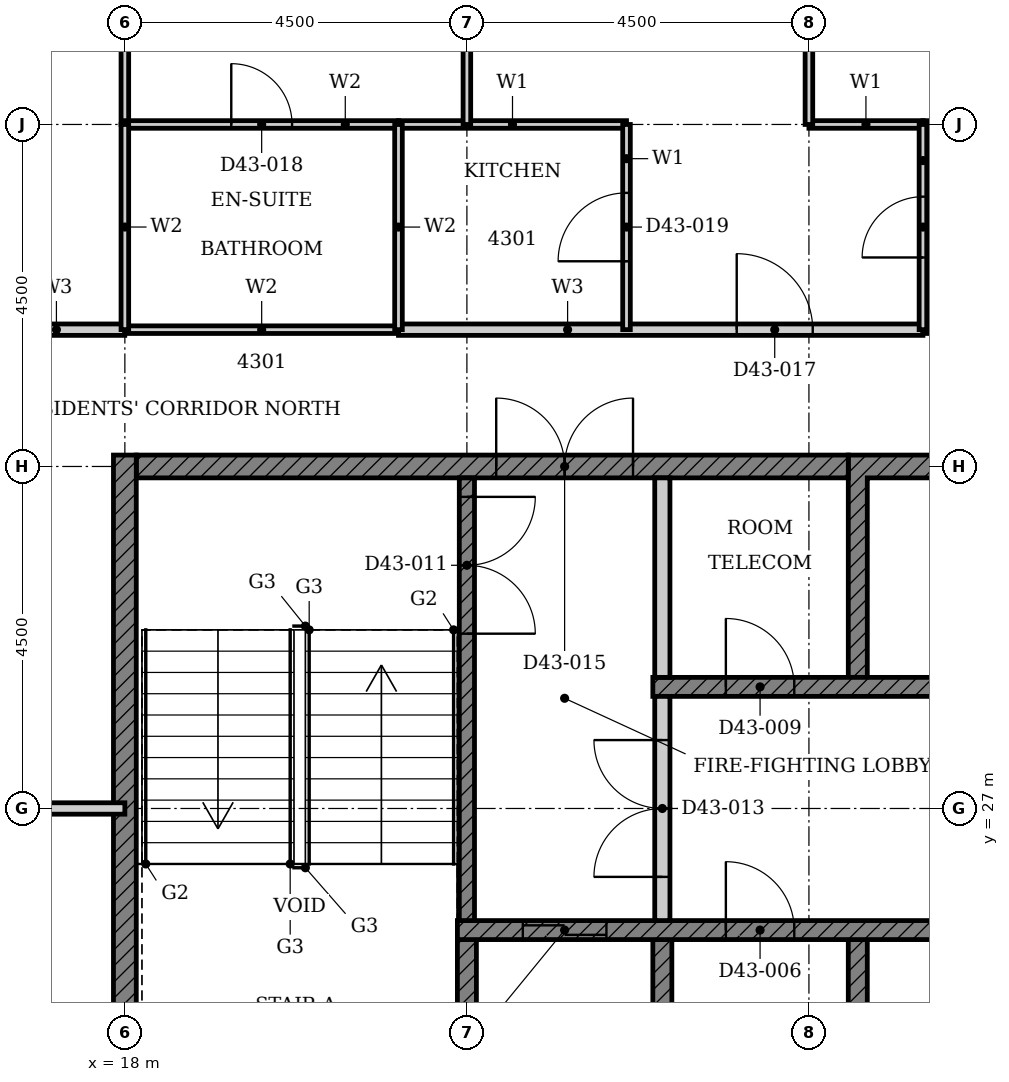
"""IFC4 building model, lengths in metres.
Left out: names, types, materials, properties, quantities, classifications, styles, units other than length and angle.
Written with IfcOpenShell. Run it as: python <this file> out.ifc"""

import sys

from ifc_helpers import new_model, si_unit, direction, frame, frame_2d, origin, place, context, subcontext, project, spatial, polyline, rectangle, outline, extrude, element, fill, save


model = new_model("IFC4")
c1 = context("Model", 3, precision=1e-05, world=origin(), true_north=direction((0.0, 1.0)))
c2 = subcontext(c1, "Body", "Model", "MODEL_VIEW")
j1 = project(units=[si_unit("LENGTHUNIT", "METRE"), si_unit("PLANEANGLEUNIT", "RADIAN")], contexts=[c1])
p1 = place(None, origin())
s1 = spatial("IfcSite", under=j1, at=p1, CompositionType="ELEMENT")
p2 = place(p1, origin())
s2 = spatial("IfcBuilding", under=s1, at=p2, CompositionType="ELEMENT")
p3 = place(p2, frame((0.0, 0.0, 172.8)))
s3 = spatial("IfcBuildingStorey", under=s2, at=p3, CompositionType="ELEMENT", Elevation=172.8)
p4 = place(p3, origin())
e1 = element("IfcWall", 1, at=p4, inside=s3, PredefinedType="SHEAR", context=c2, shape_type="SweptSolid", body=[
    extrude(outline(polyline([(22.375, 22.35), (25.197, 22.35), (25.197, 25.275), (24.947, 25.275), (24.947, 22.65), (22.625, 22.65), (22.625, 25.275), (22.375, 25.275), (22.375, 22.35)])), origin(), (0.0, 0.0, 1.0), 3.4),
])
p5 = place(p3, origin())
e2 = element("IfcWall", 2, at=p5, inside=s3, PredefinedType="SHEAR", context=c2, shape_type="SweptSolid", body=[
    extrude(outline(polyline([(27.518, 22.35), (32.911, 22.35), (32.911, 25.275), (32.661, 25.275), (32.661, 22.65), (30.339, 22.65), (30.339, 25.275), (30.089, 25.275), (30.089, 22.65), (27.768, 22.65), (27.768, 25.275), (27.518, 25.275), (27.518, 22.35)])), origin(), (0.0, 0.0, 1.0), 3.4),
])
p6 = place(p3, origin())
e3 = element("IfcWall", 3, at=p6, inside=s3, PredefinedType="SHEAR", context=c2, shape_type="SweptSolid", body=[
    extrude(outline(polyline([(27.518, 28.725), (27.768, 28.725), (27.768, 31.35), (30.089, 31.35), (30.089, 28.725), (30.339, 28.725), (30.339, 31.35), (32.661, 31.35), (32.661, 28.725), (32.911, 28.725), (32.911, 31.65), (27.518, 31.65), (27.518, 28.725)])), origin(), (0.0, 0.0, 1.0), 3.4),
])
p7 = place(p3, frame((18.15, 31.5, 0.0), z_axis=(0.0, 0.0, 1.0), x_axis=(1.0, 0.0, 0.0)))
e4 = element("IfcWall", 4, at=p7, inside=s3, PredefinedType="SHEAR", context=c2, shape_type="SweptSolid", body=[
    extrude(rectangle(XDim=9.368, YDim=0.3, at=frame_2d((4.684, 0.0))), origin(), (0.0, 0.0, 1.0), 3.4),
])
p8 = place(p7, frame((4.736, 0.0, 0.0)))
e5 = element("IfcOpeningElement", 5, at=p8, cuts=e4, PredefinedType="OPENING", context=c2, shape_type="SweptSolid", body=[
    extrude(rectangle(XDim=1.8, YDim=2.1, at=frame_2d((0.9, 1.05))), frame((0.0, 0.16, 0.0), z_axis=(0.0, -1.0, 0.0), x_axis=(1.0, 0.0, 0.0)), (0.0, 0.0, 1.0), 0.32),
])
p9 = place(p3, frame((18.0, 22.35, 0.0), z_axis=(0.0, 0.0, 1.0), x_axis=(0.0, 1.0, 0.0)))
e6 = element("IfcWall", 6, at=p9, inside=s3, PredefinedType="SHEAR", context=c2, shape_type="SweptSolid", body=[
    extrude(rectangle(XDim=9.3, YDim=0.3, at=frame_2d((4.65, 0.0))), origin(), (0.0, 0.0, 1.0), 3.4),
])
p10 = place(p3, frame((22.375, 25.4, 0.0), z_axis=(0.0, 0.0, 1.0), x_axis=(1.0, 0.0, 0.0)))
e7 = element("IfcWall", 7, at=p10, inside=s3, PredefinedType="SHEAR", context=c2, shape_type="SweptSolid", body=[
    extrude(rectangle(XDim=15.678, YDim=0.25, at=frame_2d((7.839, 0.0))), origin(), (0.0, 0.0, 1.0), 3.4),
])
p11 = place(p10, frame((8.575, 0.0, 0.0)))
e8 = element("IfcOpeningElement", 8, at=p11, cuts=e7, PredefinedType="OPENING", context=c2, shape_type="SweptSolid", body=[
    extrude(rectangle(XDim=1.1, YDim=2.1, at=frame_2d((0.55, 1.05))), frame((0.0, 0.135, 0.0), z_axis=(0.0, -1.0, 0.0), x_axis=(1.0, 0.0, 0.0)), (0.0, 0.0, 1.0), 0.27),
])
p12 = place(p10, frame((0.861, 0.0, 0.0)))
e9 = element("IfcOpeningElement", 9, at=p12, cuts=e7, PredefinedType="OPENING", context=c2, shape_type="SweptSolid", body=[
    extrude(rectangle(XDim=1.1, YDim=2.1, at=frame_2d((0.55, 1.05))), frame((0.0, 0.135, 0.0), z_axis=(0.0, -1.0, 0.0), x_axis=(1.0, 0.0, 0.0)), (0.0, 0.0, 1.0), 0.27),
])
p13 = place(p10, frame((3.532, 0.0, 0.0)))
e10 = element("IfcOpeningElement", 10, at=p13, cuts=e7, PredefinedType="OPENING", context=c2, shape_type="SweptSolid", body=[
    extrude(rectangle(XDim=0.9, YDim=2.1, at=frame_2d((0.45, 1.05))), frame((0.0, 0.135, 0.0), z_axis=(0.0, -1.0, 0.0), x_axis=(1.0, 0.0, 0.0)), (0.0, 0.0, 1.0), 0.27),
])
p14 = place(p10, frame((11.246, 0.0, 0.0)))
e11 = element("IfcOpeningElement", 11, at=p14, cuts=e7, PredefinedType="OPENING", context=c2, shape_type="SweptSolid", body=[
    extrude(rectangle(XDim=0.9, YDim=2.1, at=frame_2d((0.45, 1.05))), frame((0.0, 0.135, 0.0), z_axis=(0.0, -1.0, 0.0), x_axis=(1.0, 0.0, 0.0)), (0.0, 0.0, 1.0), 0.27),
])
p15 = place(p10, frame((13.818, 0.0, 0.0)))
e12 = element("IfcOpeningElement", 12, at=p15, cuts=e7, PredefinedType="OPENING", context=c2, shape_type="SweptSolid", body=[
    extrude(rectangle(XDim=0.9, YDim=2.1, at=frame_2d((0.45, 1.05))), frame((0.0, 0.135, 0.0), z_axis=(0.0, -1.0, 0.0), x_axis=(1.0, 0.0, 0.0)), (0.0, 0.0, 1.0), 0.27),
])
p16 = place(p3, frame((24.947, 28.6, 0.0), z_axis=(0.0, 0.0, 1.0), x_axis=(1.0, 0.0, 0.0)))
e13 = element("IfcWall", 13, at=p16, inside=s3, PredefinedType="SHEAR", context=c2, shape_type="SweptSolid", body=[
    extrude(rectangle(XDim=15.678, YDim=0.25, at=frame_2d((7.839, 0.0))), origin(), (0.0, 0.0, 1.0), 3.4),
])
p17 = place(p16, frame((6.004, 0.0, 0.0)))
e14 = element("IfcOpeningElement", 14, at=p17, cuts=e13, PredefinedType="OPENING", context=c2, shape_type="SweptSolid", body=[
    extrude(rectangle(XDim=1.1, YDim=2.1, at=frame_2d((0.55, 1.05))), frame((0.0, 0.135, 0.0), z_axis=(0.0, -1.0, 0.0), x_axis=(1.0, 0.0, 0.0)), (0.0, 0.0, 1.0), 0.27),
])
p18 = place(p16, frame((11.146, 0.0, 0.0)))
e15 = element("IfcOpeningElement", 15, at=p18, cuts=e13, PredefinedType="OPENING", context=c2, shape_type="SweptSolid", body=[
    extrude(rectangle(XDim=1.1, YDim=2.1, at=frame_2d((0.55, 1.05))), frame((0.0, 0.135, 0.0), z_axis=(0.0, -1.0, 0.0), x_axis=(1.0, 0.0, 0.0)), (0.0, 0.0, 1.0), 0.27),
])
p19 = place(p16, frame((13.718, 0.0, 0.0)))
e16 = element("IfcOpeningElement", 16, at=p19, cuts=e13, PredefinedType="OPENING", context=c2, shape_type="SweptSolid", body=[
    extrude(rectangle(XDim=1.1, YDim=2.1, at=frame_2d((0.55, 1.05))), frame((0.0, 0.135, 0.0), z_axis=(0.0, -1.0, 0.0), x_axis=(1.0, 0.0, 0.0)), (0.0, 0.0, 1.0), 0.27),
])
p20 = place(p16, frame((0.961, 0.0, 0.0)))
e17 = element("IfcOpeningElement", 17, at=p20, cuts=e13, PredefinedType="OPENING", context=c2, shape_type="SweptSolid", body=[
    extrude(rectangle(XDim=0.9, YDim=2.1, at=frame_2d((0.45, 1.05))), frame((0.0, 0.135, 0.0), z_axis=(0.0, -1.0, 0.0), x_axis=(1.0, 0.0, 0.0)), (0.0, 0.0, 1.0), 0.27),
])
p21 = place(p16, frame((8.675, 0.0, 0.0)))
e18 = element("IfcOpeningElement", 18, at=p21, cuts=e13, PredefinedType="OPENING", context=c2, shape_type="SweptSolid", body=[
    extrude(rectangle(XDim=0.9, YDim=2.1, at=frame_2d((0.45, 1.05))), frame((0.0, 0.135, 0.0), z_axis=(0.0, -1.0, 0.0), x_axis=(1.0, 0.0, 0.0)), (0.0, 0.0, 1.0), 0.27),
])
p22 = place(p3, frame((25.072, 28.725, 0.0), z_axis=(0.0, 0.0, 1.0), x_axis=(0.0, 1.0, 0.0)))
e19 = element("IfcWall", 19, at=p22, inside=s3, PredefinedType="PARTITIONING", context=c2, shape_type="SweptSolid", body=[
    extrude(rectangle(XDim=2.625, YDim=0.2, at=frame_2d((1.312, 0.0))), origin(), (0.0, 0.0, 1.0), 3.4),
])
p23 = place(p3, frame((22.5, 31.35, 0.0), z_axis=(0.0, 0.0, 1.0), x_axis=(0.0, -1.0, 0.0)))
e20 = element("IfcWall", 20, at=p23, inside=s3, PredefinedType="SHEAR", context=c2, shape_type="SweptSolid", body=[
    extrude(rectangle(XDim=5.825, YDim=0.2, at=frame_2d((2.913, 0.0))), origin(), (0.0, 0.0, 1.0), 3.4),
])
p24 = place(p23, frame((0.25, 0.0, 0.0)))
e21 = element("IfcOpeningElement", 21, at=p24, cuts=e20, PredefinedType="OPENING", context=c2, shape_type="SweptSolid", body=[
    extrude(rectangle(XDim=1.8, YDim=2.1, at=frame_2d((0.9, 1.05))), frame((0.0, 0.11, 0.0), z_axis=(0.0, -1.0, 0.0), x_axis=(1.0, 0.0, 0.0)), (0.0, 0.0, 1.0), 0.22),
])
p25 = place(p3, frame((25.072, 25.525, 0.0), z_axis=(0.0, 0.0, 1.0), x_axis=(0.0, 1.0, 0.0)))
e22 = element("IfcWall", 22, at=p25, inside=s3, PredefinedType="PARTITIONING", context=c2, shape_type="SweptSolid", body=[
    extrude(rectangle(XDim=2.95, YDim=0.2, at=frame_2d((1.475, 0.0))), origin(), (0.0, 0.0, 1.0), 3.4),
])
p26 = place(p25, frame((0.575, 0.0, 0.0)))
e23 = element("IfcOpeningElement", 23, at=p26, cuts=e22, PredefinedType="OPENING", context=c2, shape_type="SweptSolid", body=[
    extrude(rectangle(XDim=1.8, YDim=2.1, at=frame_2d((0.9, 1.05))), frame((0.0, 0.11, 0.0), z_axis=(0.0, -1.0, 0.0), x_axis=(1.0, 0.0, 0.0)), (0.0, 0.0, 1.0), 0.22),
])
p27 = place(p3, frame((4.5, 27.0, 0.0), z_axis=(0.0, 0.0, 1.0), x_axis=(1.0, 0.0, 0.0)))
e24 = element("IfcWall", 24, at=p27, inside=s3, PredefinedType="PARTITIONING", context=c2, shape_type="SweptSolid", body=[
    extrude(rectangle(XDim=13.5, YDim=0.15, at=frame_2d((6.75, 0.0))), origin(), (0.0, 0.0, 1.0), 2.68),
])
p28 = place(p27, frame((5.35, 0.0, 0.0)))
e25 = element("IfcOpeningElement", 25, at=p28, cuts=e24, PredefinedType="OPENING", context=c2, shape_type="SweptSolid", body=[
    extrude(rectangle(XDim=1.0, YDim=2.1, at=frame_2d((0.5, 1.05))), frame((0.0, 0.085, 0.0), z_axis=(0.0, -1.0, 0.0), x_axis=(1.0, 0.0, 0.0)), (0.0, 0.0, 1.0), 0.17),
])
p29 = place(p3, frame((21.6, 33.3, 0.0), z_axis=(0.0, 0.0, 1.0), x_axis=(1.0, 0.0, 0.0)))
e26 = element("IfcWall", 26, at=p29, inside=s3, PredefinedType="PARTITIONING", context=c2, shape_type="SweptSolid", body=[
    extrude(rectangle(XDim=6.9, YDim=0.15, at=frame_2d((3.45, 0.0))), origin(), (0.0, 0.0, 1.0), 3.4),
])
p30 = place(p29, frame((4.45, 0.0, 0.0)))
e27 = element("IfcOpeningElement", 27, at=p30, cuts=e26, PredefinedType="OPENING", context=c2, shape_type="SweptSolid", body=[
    extrude(rectangle(XDim=1.0, YDim=2.2, at=frame_2d((0.5, 1.1))), frame((0.0, 0.085, 0.0), z_axis=(0.0, -1.0, 0.0), x_axis=(1.0, 0.0, 0.0)), (0.0, 0.0, 1.0), 0.17),
])
p31 = place(p3, frame((16.2, 33.3, 0.0), z_axis=(0.0, 0.0, 1.0), x_axis=(1.0, 0.0, 0.0)))
e28 = element("IfcWall", 28, at=p31, inside=s3, PredefinedType="PARTITIONING", context=c2, shape_type="SweptSolid", body=[
    extrude(rectangle(XDim=1.799, YDim=0.15, at=frame_2d((0.899, 0.0))), origin(), (0.0, 0.0, 1.0), 3.4),
])
p32 = place(p3, frame((27.0, 36.0, 0.0), z_axis=(0.0, 0.0, 1.0), x_axis=(1.0, 0.0, 0.0)))
e29 = element("IfcWall", 29, at=p32, inside=s3, PredefinedType="PARTITIONING", context=c2, shape_type="SweptSolid", body=[
    extrude(rectangle(XDim=1.5, YDim=0.1, at=frame_2d((0.75, 0.0))), origin(), (0.0, 0.0, 1.0), 3.4),
])
p33 = place(p3, frame((21.6, 36.0, 0.0), z_axis=(0.0, 0.0, 1.0), x_axis=(1.0, 0.0, 0.0)))
e30 = element("IfcWall", 30, at=p33, inside=s3, PredefinedType="PARTITIONING", context=c2, shape_type="SweptSolid", body=[
    extrude(rectangle(XDim=3.0, YDim=0.1, at=frame_2d((1.5, 0.0))), origin(), (0.0, 0.0, 1.0), 3.4),
])
p34 = place(p3, frame((18.0, 36.0, 0.0), z_axis=(0.0, 0.0, 1.0), x_axis=(0.0, 1.0, 0.0)))
e31 = element("IfcWall", 31, at=p34, inside=s3, PredefinedType="PARTITIONING", context=c2, shape_type="SweptSolid", body=[
    extrude(rectangle(XDim=2.44, YDim=0.1, at=frame_2d((1.22, 0.0))), origin(), (0.0, 0.0, 1.0), 3.4),
])
p35 = place(p3, frame((22.5, 36.0, 0.0), z_axis=(0.0, 0.0, 1.0), x_axis=(0.0, 1.0, 0.0)))
e32 = element("IfcWall", 32, at=p35, inside=s3, PredefinedType="PARTITIONING", context=c2, shape_type="SweptSolid", body=[
    extrude(rectangle(XDim=4.815, YDim=0.1, at=frame_2d((2.407, 0.0))), origin(), (0.0, 0.0, 1.0), 3.4),
])
p36 = place(p35, frame((1.8, 0.0, 0.0)))
e33 = element("IfcOpeningElement", 33, at=p36, cuts=e32, PredefinedType="OPENING", context=c2, shape_type="SweptSolid", body=[
    extrude(rectangle(XDim=0.9, YDim=2.1, at=frame_2d((0.45, 1.05))), frame((0.0, 0.06, 0.0), z_axis=(0.0, -1.0, 0.0), x_axis=(1.0, 0.0, 0.0)), (0.0, 0.0, 1.0), 0.12),
])
p37 = place(p3, frame((24.6, 33.3, 0.0), z_axis=(0.0, 0.0, 1.0), x_axis=(0.0, 1.0, 0.0)))
e34 = element("IfcWall", 34, at=p37, inside=s3, PredefinedType="PARTITIONING", context=c2, shape_type="SweptSolid", body=[
    extrude(rectangle(XDim=2.7, YDim=0.1, at=frame_2d((1.35, 0.0))), origin(), (0.0, 0.0, 1.0), 3.4),
])
p38 = place(p37, frame((0.9, 0.0, 0.0)))
e35 = element("IfcOpeningElement", 35, at=p38, cuts=e34, PredefinedType="OPENING", context=c2, shape_type="SweptSolid", body=[
    extrude(rectangle(XDim=0.9, YDim=2.1, at=frame_2d((0.45, 1.05))), frame((0.0, 0.06, 0.0), z_axis=(0.0, -1.0, 0.0), x_axis=(1.0, 0.0, 0.0)), (0.0, 0.0, 1.0), 0.12),
])
p39 = place(p3, frame((27.0, 36.0, 0.0), z_axis=(0.0, 0.0, 1.0), x_axis=(0.0, 1.0, 0.0)))
e36 = element("IfcWall", 36, at=p39, inside=s3, PredefinedType="PARTITIONING", context=c2, shape_type="SweptSolid", body=[
    extrude(rectangle(XDim=4.69, YDim=0.1, at=frame_2d((2.345, 0.0))), origin(), (0.0, 0.0, 1.0), 3.4),
])
p40 = place(p39, frame((1.8, 0.0, 0.0)))
e37 = element("IfcOpeningElement", 37, at=p40, cuts=e36, PredefinedType="OPENING", context=c2, shape_type="SweptSolid", body=[
    extrude(rectangle(XDim=0.9, YDim=2.1, at=frame_2d((0.45, 1.05))), frame((0.0, 0.06, 0.0), z_axis=(0.0, -1.0, 0.0), x_axis=(1.0, 0.0, 0.0)), (0.0, 0.0, 1.0), 0.12),
])
p41 = place(p3, frame((28.5, 33.3, 0.0), z_axis=(0.0, 0.0, 1.0), x_axis=(1.0, 0.0, 0.0)))
e38 = element("IfcWall", 38, at=p41, inside=s3, PredefinedType="PARTITIONING", context=c2, shape_type="SweptSolid", body=[
    extrude(rectangle(XDim=6.6, YDim=0.1, at=frame_2d((3.3, 0.0))), origin(), (0.0, 0.0, 1.0), 3.4),
])
p42 = place(p3, frame((18.0, 33.3, 0.0), z_axis=(0.0, 0.0, 1.0), x_axis=(1.0, 0.0, 0.0)))
e39 = element("IfcWall", 39, at=p42, inside=s3, PredefinedType="PARTITIONING", context=c2, shape_type="SweptSolid", body=[
    extrude(rectangle(XDim=3.6, YDim=0.1, at=frame_2d((1.8, 0.0))), origin(), (0.0, 0.0, 1.0), 3.4),
])
p43 = place(p3, frame((28.5, 36.0, 0.0), z_axis=(0.0, 0.0, 1.0), x_axis=(1.0, 0.0, 0.0)))
e40 = element("IfcWall", 40, at=p43, inside=s3, PredefinedType="PARTITIONING", context=c2, shape_type="SweptSolid", body=[
    extrude(rectangle(XDim=6.6, YDim=0.1, at=frame_2d((3.3, 0.0))), origin(), (0.0, 0.0, 1.0), 3.4),
])
p44 = place(p43, frame((4.4, 0.0, 0.0)))
e41 = element("IfcOpeningElement", 41, at=p44, cuts=e40, PredefinedType="OPENING", context=c2, shape_type="SweptSolid", body=[
    extrude(rectangle(XDim=0.8, YDim=2.1, at=frame_2d((0.4, 1.05))), frame((0.0, 0.06, 0.0), z_axis=(0.0, -1.0, 0.0), x_axis=(1.0, 0.0, 0.0)), (0.0, 0.0, 1.0), 0.12),
])
p45 = place(p3, frame((18.0, 36.0, 0.0), z_axis=(0.0, 0.0, 1.0), x_axis=(1.0, 0.0, 0.0)))
e42 = element("IfcWall", 42, at=p45, inside=s3, PredefinedType="PARTITIONING", context=c2, shape_type="SweptSolid", body=[
    extrude(rectangle(XDim=3.6, YDim=0.1, at=frame_2d((1.8, 0.0))), origin(), (0.0, 0.0, 1.0), 3.4),
])
p46 = place(p45, frame((1.4, 0.0, 0.0)))
e43 = element("IfcOpeningElement", 43, at=p46, cuts=e42, PredefinedType="OPENING", context=c2, shape_type="SweptSolid", body=[
    extrude(rectangle(XDim=0.8, YDim=2.1, at=frame_2d((0.4, 1.05))), frame((0.0, 0.06, 0.0), z_axis=(0.0, -1.0, 0.0), x_axis=(1.0, 0.0, 0.0)), (0.0, 0.0, 1.0), 0.12),
])
p47 = place(p3, frame((18.0, 33.301, 0.0), z_axis=(0.0, 0.0, 1.0), x_axis=(0.0, 1.0, 0.0)))
e44 = element("IfcWall", 44, at=p47, inside=s3, PredefinedType="PARTITIONING", context=c2, shape_type="SweptSolid", body=[
    extrude(rectangle(XDim=2.699, YDim=0.1, at=frame_2d((1.35, 0.0))), origin(), (0.0, 0.0, 1.0), 3.4),
])
p48 = place(p3, frame((21.6, 33.3, 0.0), z_axis=(0.0, 0.0, 1.0), x_axis=(0.0, 1.0, 0.0)))
e45 = element("IfcWall", 45, at=p48, inside=s3, PredefinedType="PARTITIONING", context=c2, shape_type="SweptSolid", body=[
    extrude(rectangle(XDim=2.7, YDim=0.1, at=frame_2d((1.35, 0.0))), origin(), (0.0, 0.0, 1.0), 3.4),
])
p49 = place(p3, frame((28.5, 33.3, 0.0), z_axis=(0.0, 0.0, 1.0), x_axis=(0.0, 1.0, 0.0)))
e46 = element("IfcWall", 46, at=p49, inside=s3, PredefinedType="PARTITIONING", context=c2, shape_type="SweptSolid", body=[
    extrude(rectangle(XDim=2.7, YDim=0.1, at=frame_2d((1.35, 0.0))), origin(), (0.0, 0.0, 1.0), 3.4),
])
p50 = place(p49, frame((0.95, 0.0, 0.0)))
e47 = element("IfcOpeningElement", 47, at=p50, cuts=e46, PredefinedType="OPENING", context=c2, shape_type="SweptSolid", body=[
    extrude(rectangle(XDim=0.8, YDim=2.1, at=frame_2d((0.4, 1.05))), frame((0.0, 0.06, 0.0), z_axis=(0.0, -1.0, 0.0), x_axis=(1.0, 0.0, 0.0)), (0.0, 0.0, 1.0), 0.12),
])
p51 = place(p12, origin())
e48 = element("IfcDoor", 48, at=p51, inside=s3, OperationType="DOUBLE_DOOR_SLIDING", PredefinedType="DOOR", context=c2, shape_type="SweptSolid", body=[
    extrude(rectangle(XDim=1.1, YDim=2.1, at=frame_2d((0.55, 1.05))), frame((0.0, 0.025, 0.0), z_axis=(0.0, -1.0, 0.0), x_axis=(1.0, 0.0, 0.0)), (0.0, 0.0, 1.0), 0.05),
])
fill(e9, e48)
p52 = place(p13, origin())
e49 = element("IfcDoor", 49, at=p52, inside=s3, OperationType="SINGLE_SWING_LEFT", PredefinedType="DOOR", context=c2, shape_type="SweptSolid", body=[
    extrude(rectangle(XDim=0.9, YDim=2.1, at=frame_2d((0.45, 1.05))), frame((0.0, 0.025, 0.0), z_axis=(0.0, -1.0, 0.0), x_axis=(1.0, 0.0, 0.0)), (0.0, 0.0, 1.0), 0.05),
])
fill(e10, e49)
p53 = place(p20, origin())
e50 = element("IfcDoor", 50, at=p53, inside=s3, OperationType="SINGLE_SWING_LEFT", PredefinedType="DOOR", context=c2, shape_type="SweptSolid", body=[
    extrude(rectangle(XDim=0.9, YDim=2.1, at=frame_2d((0.45, 1.05))), frame((0.0, 0.025, 0.0), z_axis=(0.0, -1.0, 0.0), x_axis=(1.0, 0.0, 0.0)), (0.0, 0.0, 1.0), 0.05),
])
fill(e17, e50)
p54 = place(p24, origin())
e51 = element("IfcDoor", 51, at=p54, inside=s3, OperationType="DOUBLE_DOOR_SINGLE_SWING", PredefinedType="DOOR", context=c2, shape_type="SweptSolid", body=[
    extrude(rectangle(XDim=1.8, YDim=2.1, at=frame_2d((0.9, 1.05))), frame((0.0, 0.025, 0.0), z_axis=(0.0, -1.0, 0.0), x_axis=(1.0, 0.0, 0.0)), (0.0, 0.0, 1.0), 0.05),
])
fill(e21, e51)
p55 = place(p26, origin())
e52 = element("IfcDoor", 52, at=p55, inside=s3, OperationType="DOUBLE_DOOR_SINGLE_SWING", PredefinedType="DOOR", context=c2, shape_type="SweptSolid", body=[
    extrude(rectangle(XDim=1.8, YDim=2.1, at=frame_2d((0.9, 1.05))), frame((0.0, 0.025, 0.0), z_axis=(0.0, -1.0, 0.0), x_axis=(1.0, 0.0, 0.0)), (0.0, 0.0, 1.0), 0.05),
])
fill(e23, e52)
p56 = place(p8, origin())
e53 = element("IfcDoor", 53, at=p56, inside=s3, OperationType="DOUBLE_DOOR_SINGLE_SWING", PredefinedType="DOOR", context=c2, shape_type="SweptSolid", body=[
    extrude(rectangle(XDim=1.8, YDim=2.1, at=frame_2d((0.9, 1.05))), frame((0.0, 0.025, 0.0), z_axis=(0.0, -1.0, 0.0), x_axis=(1.0, 0.0, 0.0)), (0.0, 0.0, 1.0), 0.05),
])
fill(e5, e53)
p57 = place(p30, origin())
e54 = element("IfcDoor", 54, at=p57, inside=s3, OperationType="SINGLE_SWING_LEFT", PredefinedType="DOOR", context=c2, shape_type="SweptSolid", body=[
    extrude(rectangle(XDim=1.0, YDim=2.2, at=frame_2d((0.5, 1.1))), frame((0.0, 0.025, 0.0), z_axis=(0.0, -1.0, 0.0), x_axis=(1.0, 0.0, 0.0)), (0.0, 0.0, 1.0), 0.05),
])
fill(e27, e54)
p58 = place(p46, origin())
e55 = element("IfcDoor", 55, at=p58, inside=s3, OperationType="SINGLE_SWING_RIGHT", PredefinedType="DOOR", context=c2, shape_type="SweptSolid", body=[
    extrude(rectangle(XDim=0.8, YDim=2.1, at=frame_2d((0.4, 1.05))), frame((0.0, 0.025, 0.0), z_axis=(0.0, -1.0, 0.0), x_axis=(1.0, 0.0, 0.0)), (0.0, 0.0, 1.0), 0.05),
])
fill(e43, e55)
p59 = place(p38, origin())
e56 = element("IfcDoor", 56, at=p59, inside=s3, OperationType="SINGLE_SWING_LEFT", PredefinedType="DOOR", context=c2, shape_type="SweptSolid", body=[
    extrude(rectangle(XDim=0.9, YDim=2.1, at=frame_2d((0.45, 1.05))), frame((0.0, 0.025, 0.0), z_axis=(0.0, -1.0, 0.0), x_axis=(1.0, 0.0, 0.0)), (0.0, 0.0, 1.0), 0.05),
])
fill(e35, e56)
p60 = place(p50, origin())
e57 = element("IfcDoor", 57, at=p60, inside=s3, OperationType="SINGLE_SWING_RIGHT", PredefinedType="DOOR", context=c2, shape_type="SweptSolid", body=[
    extrude(rectangle(XDim=0.8, YDim=2.1, at=frame_2d((0.4, 1.05))), frame((0.0, 0.025, 0.0), z_axis=(0.0, -1.0, 0.0), x_axis=(1.0, 0.0, 0.0)), (0.0, 0.0, 1.0), 0.05),
])
fill(e47, e57)
save(model, sys.argv[1])
